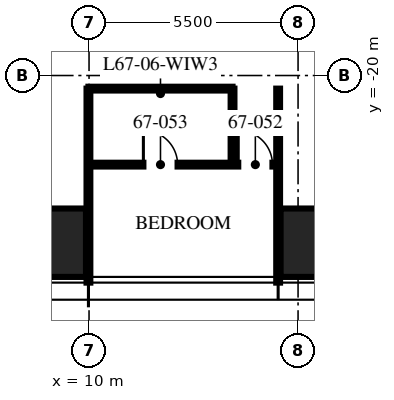
"""IFC4 building model, lengths in metres.
Left out: names, types, materials, properties, quantities, classifications, styles, units other than length and angle.
Written with IfcOpenShell. Run it as: python <this file> out.ifc"""

import sys

from ifc_helpers import new_model, si_unit, direction, frame, frame_2d, origin, origin_2d, place, context, subcontext, project, spatial, rectangle, hollow_rectangle, extrude, element, fill, save


model = new_model("IFC4")
c1 = context("Model", 3, precision=1e-05, world=origin(), true_north=direction((0.0, 1.0)))
c2 = subcontext(c1, "Body", "Model", "MODEL_VIEW")
j1 = project(units=[si_unit("LENGTHUNIT", "METRE"), si_unit("PLANEANGLEUNIT", "RADIAN")], contexts=[c1])
p1 = place(None, origin())
s1 = spatial("IfcSite", under=j1, at=p1, CompositionType="ELEMENT")
p2 = place(p1, origin())
s2 = spatial("IfcBuilding", under=s1, at=p2, CompositionType="ELEMENT")
p3 = place(p2, frame((0.0, 0.0, 267.0)))
s3 = spatial("IfcBuildingStorey", under=s2, at=p3, CompositionType="ELEMENT", Elevation=267.0)
for number, where, z_axis, x_axis in (
    (1, (16.64, -24.4, 0.0), (0.0, 0.0, 1.0), (1.0, 0.0, 0.0)),
    (2, (8.32, -24.4, 0.0), (0.0, 0.0, 1.0), (1.0, 0.0, 0.0)),
):
    element("IfcColumn", number, at=place(p3, frame(where, z_axis=z_axis, x_axis=x_axis)), inside=s3, PredefinedType="COLUMN", context=c2, shape_type="SweptSolid", body=[
        extrude(hollow_rectangle(XDim=3.2, YDim=1.8, WallThickness=0.14, at=origin_2d()), origin(), (0.0, 0.0, 1.0), 3.75),
    ])
for number, where, z_axis, x_axis in (
    (3, (9.984, -20.345, 0.0), (0.0, 0.0, 1.0), (0.0, -1.0, 0.0)),
    (4, (14.976, -20.345, 0.0), (0.0, 0.0, 1.0), (0.0, -1.0, 0.0)),
):
    element("IfcWall", number, at=place(p3, frame(where, z_axis=z_axis, x_axis=x_axis)), inside=s3, PredefinedType="PARTITIONING", context=c2, shape_type="SweptSolid", body=[
        extrude(rectangle(XDim=5.105, YDim=0.1, at=frame_2d((2.552, 0.0))), origin(), (0.0, 0.0, 1.0), 2.91),
    ])
p4 = place(p3, frame((9.984, -22.345, 0.0), z_axis=(0.0, 0.0, 1.0), x_axis=(1.0, 0.0, 0.0)))
e5 = element("IfcWall", 5, at=p4, inside=s3, PredefinedType="PARTITIONING", context=c2, shape_type="SweptSolid", body=[
    extrude(rectangle(XDim=4.992, YDim=0.1, at=frame_2d((2.496, 0.0))), origin(), (0.0, 0.0, 1.0), 2.81),
])
p5 = place(p4, frame((3.942, 0.0, 0.0)))
e6 = element("IfcOpeningElement", 6, at=p5, cuts=e5, PredefinedType="OPENING", context=c2, shape_type="SweptSolid", body=[
    extrude(rectangle(XDim=0.9, YDim=2.1, at=frame_2d((0.45, 1.05))), frame((0.0, 0.06, 0.0), z_axis=(0.0, -1.0, 0.0), x_axis=(1.0, 0.0, 0.0)), (0.0, 0.0, 1.0), 0.12),
])
p6 = place(p4, frame((1.446, 0.0, 0.0)))
e7 = element("IfcOpeningElement", 7, at=p6, cuts=e5, PredefinedType="OPENING", context=c2, shape_type="SweptSolid", body=[
    extrude(rectangle(XDim=0.9, YDim=2.1, at=frame_2d((0.45, 1.05))), frame((0.0, 0.06, 0.0), z_axis=(0.0, -1.0, 0.0), x_axis=(1.0, 0.0, 0.0)), (0.0, 0.0, 1.0), 0.12),
])
p7 = place(p3, frame((13.776, -20.345, 0.0), z_axis=(0.0, 0.0, 1.0), x_axis=(0.0, -1.0, 0.0)))
e8 = element("IfcWall", 8, at=p7, inside=s3, PredefinedType="PARTITIONING", context=c2, shape_type="SweptSolid", body=[
    extrude(rectangle(XDim=2.0, YDim=0.1, at=frame_2d((1.0, 0.0))), origin(), (0.0, 0.0, 1.0), 3.5),
])
p8 = place(p3, frame((9.984, -20.345, 0.0), z_axis=(0.0, 0.0, 1.0), x_axis=(1.0, 0.0, 0.0)))
e9 = element("IfcWall", 9, at=p8, inside=s3, PredefinedType="PARTITIONING", context=c2, shape_type="SweptSolid", body=[
    extrude(rectangle(XDim=3.792, YDim=0.1, at=frame_2d((1.896, 0.0))), origin(), (0.0, 0.0, 1.0), 2.81),
])
p9 = place(p5, origin())
e10 = element("IfcDoor", 10, at=p9, inside=s3, OperationType="SINGLE_SWING_LEFT", PredefinedType="DOOR", context=c2, shape_type="SweptSolid", body=[
    extrude(rectangle(XDim=0.9, YDim=2.1, at=frame_2d((0.45, 1.05))), frame((0.0, 0.025, 0.0), z_axis=(0.0, -1.0, 0.0), x_axis=(1.0, 0.0, 0.0)), (0.0, 0.0, 1.0), 0.05),
])
fill(e6, e10)
p10 = place(p6, origin())
e11 = element("IfcDoor", 11, at=p10, inside=s3, OperationType="SINGLE_SWING_LEFT", PredefinedType="DOOR", context=c2, shape_type="SweptSolid", body=[
    extrude(rectangle(XDim=0.9, YDim=2.1, at=frame_2d((0.45, 1.05))), frame((0.0, 0.025, 0.0), z_axis=(0.0, -1.0, 0.0), x_axis=(1.0, 0.0, 0.0)), (0.0, 0.0, 1.0), 0.05),
])
fill(e7, e11)
save(model, sys.argv[1])
